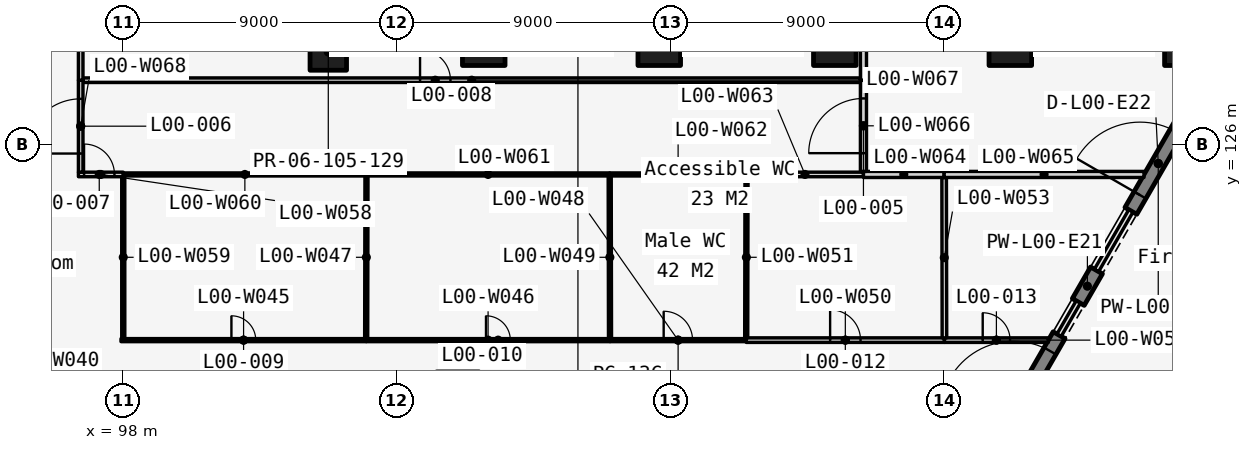
"""IFC4 building model, lengths in metres.
Left out: names, types, materials, properties, quantities, classifications, styles, units other than length and angle.
Written with IfcOpenShell. Run it as: python <this file> out.ifc"""

import sys

from ifc_helpers import new_model, si_unit, direction, frame, frame_2d, origin, origin_2d, place, context, subcontext, project, spatial, rectangle, extrude, element, fill, save


model = new_model("IFC4")
c1 = context("Model", 3, precision=1e-05, world=origin(), true_north=direction((0.0, 1.0)))
c2 = subcontext(c1, "Body", "Model", "MODEL_VIEW")
j1 = project(units=[si_unit("LENGTHUNIT", "METRE"), si_unit("PLANEANGLEUNIT", "RADIAN")], contexts=[c1])
p1 = place(None, origin())
s1 = spatial("IfcSite", under=j1, at=p1, CompositionType="ELEMENT")
p2 = place(p1, origin())
s2 = spatial("IfcBuilding", under=s1, at=p2, CompositionType="ELEMENT")
p3 = place(p2, origin())
s3 = spatial("IfcBuildingStorey", under=s2, at=p3, CompositionType="ELEMENT", Elevation=0.0)
for number, where, z_axis, x_axis in (
    (1, (109.857, 129.284, 0.0), (0.0, 0.0, 1.0), (1.0, 0.0, 0.0)),
    (2, (115.63, 129.284, 0.0), (0.0, 0.0, 1.0), (1.0, 0.0, 0.0)),
    (3, (121.404, 129.284, 0.0), (0.0, 0.0, 1.0), (1.0, 0.0, 0.0)),
    (4, (127.177, 129.284, 0.0), (0.0, 0.0, 1.0), (1.0, 0.0, 0.0)),
    (5, (132.951, 129.284, 0.0), (0.0, 0.0, 1.0), (1.0, 0.0, 0.0)),
):
    element("IfcColumn", number, at=place(p3, frame(where, z_axis=z_axis, x_axis=x_axis)), inside=s3, PredefinedType="COLUMN", context=c2, shape_type="SweptSolid", body=[
        extrude(rectangle(XDim=1.4, YDim=1.4, at=origin_2d()), origin(), (0.0, 0.0, 1.0), 7.5),
    ])
p4 = place(p3, frame((104.744, 129.028, 0.0), z_axis=(0.0, 0.0, 1.0), x_axis=(1.0, 0.0, 0.0)))
e6 = element("IfcColumn", 6, at=p4, inside=s3, PredefinedType="COLUMN", context=c2, shape_type="SweptSolid", body=[
    extrude(rectangle(XDim=1.2, YDim=1.2, at=origin_2d()), origin(), (0.0, 0.0, 1.0), 7.5),
])
p5 = place(p3, frame((126.982, 116.595, -0.3), z_axis=(0.0, 0.0, 1.0), x_axis=(0.500012057535, 0.866018442252, 0.0)))
e7 = element("IfcWall", 7, at=p5, inside=s3, PredefinedType="SOLIDWALL", context=c2, shape_type="SweptSolid", body=[
    extrude(rectangle(XDim=3.6, YDim=0.45, at=frame_2d((1.8, 0.0))), origin(), (0.0, 0.0, 1.0), 6.812),
])
p6 = place(p5, frame((0.6, 0.0, 0.3)))
e8 = element("IfcOpeningElement", 8, at=p6, cuts=e7, PredefinedType="OPENING", context=c2, shape_type="SweptSolid", body=[
    extrude(rectangle(XDim=2.4, YDim=3.0, at=frame_2d((1.2, 1.5))), frame((0.0, 0.235, 0.0), z_axis=(0.0, -1.0, 0.0), x_axis=(1.0, 0.0, 0.0)), (0.0, 0.0, 1.0), 0.47),
])
p7 = place(p3, frame((129.412, 120.805, -0.3), z_axis=(0.0, 0.0, 1.0), x_axis=(0.50012165622, 0.865955154139, 0.0)))
e9 = element("IfcWall", 9, at=p7, inside=s3, PredefinedType="SOLIDWALL", context=c2, shape_type="SweptSolid", body=[
    extrude(rectangle(XDim=1.2, YDim=0.45, at=frame_2d((0.6, 0.0))), origin(), (0.0, 0.0, 1.0), 6.812),
])
p8 = place(p3, frame((131.142, 123.802, -0.3), z_axis=(0.0, 0.0, 1.0), x_axis=(0.500012057535, 0.866018442252, 0.0)))
e10 = element("IfcWall", 10, at=p8, inside=s3, PredefinedType="SOLIDWALL", context=c2, shape_type="SweptSolid", body=[
    extrude(rectangle(XDim=3.6, YDim=0.45, at=frame_2d((1.8, 0.0))), origin(), (0.0, 0.0, 1.0), 6.812),
])
p9 = place(p8, frame((0.6, 0.0, 0.3)))
e11 = element("IfcOpeningElement", 11, at=p9, cuts=e10, PredefinedType="OPENING", context=c2, shape_type="SweptSolid", body=[
    extrude(rectangle(XDim=2.4, YDim=3.0, at=frame_2d((1.2, 1.5))), frame((0.0, 0.235, 0.0), z_axis=(0.0, -1.0, 0.0), x_axis=(1.0, 0.0, 0.0)), (0.0, 0.0, 1.0), 0.47),
])
p10 = place(p3, frame((97.926, 119.55, 0.0), z_axis=(0.0, 0.0, 1.0), x_axis=(1.0, 0.0, 0.0)))
e12 = element("IfcWall", 12, at=p10, inside=s3, PredefinedType="PARTITIONING", context=c2, shape_type="SweptSolid", body=[
    extrude(rectangle(XDim=8.064, YDim=0.1, at=frame_2d((4.032, 0.0))), origin(), (0.0, 0.0, 1.0), 7.2),
])
p11 = place(p10, frame((3.632, 0.0, 0.0)))
e13 = element("IfcOpeningElement", 13, at=p11, cuts=e12, PredefinedType="OPENING", context=c2, shape_type="SweptSolid", body=[
    extrude(rectangle(XDim=0.8, YDim=2.1, at=frame_2d((0.4, 1.05))), frame((0.0, 0.06, 0.0), z_axis=(0.0, -1.0, 0.0), x_axis=(1.0, 0.0, 0.0)), (0.0, 0.0, 1.0), 0.12),
])
p12 = place(p3, frame((105.99, 119.55, 0.0), z_axis=(0.0, 0.0, 1.0), x_axis=(1.0, 0.0, 0.0)))
e14 = element("IfcWall", 14, at=p12, inside=s3, PredefinedType="PARTITIONING", context=c2, shape_type="SweptSolid", body=[
    extrude(rectangle(XDim=8.02, YDim=0.1, at=frame_2d((4.01, 0.0))), origin(), (0.0, 0.0, 1.0), 7.2),
])
p13 = place(p12, frame((3.941, 0.0, 0.0)))
e15 = element("IfcOpeningElement", 15, at=p13, cuts=e14, PredefinedType="OPENING", context=c2, shape_type="SweptSolid", body=[
    extrude(rectangle(XDim=0.8, YDim=2.1, at=frame_2d((0.4, 1.05))), frame((0.0, 0.06, 0.0), z_axis=(0.0, -1.0, 0.0), x_axis=(1.0, 0.0, 0.0)), (0.0, 0.0, 1.0), 0.12),
])
p14 = place(p3, frame((105.99, 119.625, 0.0), z_axis=(0.0, 0.0, 1.0), x_axis=(0.001796487036, 0.999998386316, 0.0)))
e16 = element("IfcWall", 16, at=p14, inside=s3, PredefinedType="PARTITIONING", context=c2, shape_type="SweptSolid", body=[
    extrude(rectangle(XDim=5.3, YDim=0.1, at=frame_2d((2.65, 0.0))), origin(), (0.0, 0.0, 1.0), 7.2),
])
p15 = place(p3, frame((114.01, 119.55, 0.0), z_axis=(0.0, 0.0, 1.0), x_axis=(1.0, 0.0, 0.0)))
e17 = element("IfcWall", 17, at=p15, inside=s3, PredefinedType="PARTITIONING", context=c2, shape_type="SweptSolid", body=[
    extrude(rectangle(XDim=4.48, YDim=0.1, at=frame_2d((2.24, 0.0))), origin(), (0.0, 0.0, 1.0), 7.2),
])
p16 = place(p15, frame((1.765, 0.0, 0.0)))
e18 = element("IfcOpeningElement", 18, at=p16, cuts=e17, PredefinedType="OPENING", context=c2, shape_type="SweptSolid", body=[
    extrude(rectangle(XDim=0.95, YDim=2.1, at=frame_2d((0.475, 1.05))), frame((0.0, 0.06, 0.0), z_axis=(0.0, -1.0, 0.0), x_axis=(1.0, 0.0, 0.0)), (0.0, 0.0, 1.0), 0.12),
])
p17 = place(p3, frame((114.01, 119.625, 0.0), z_axis=(0.0, 0.0, 1.0), x_axis=(-0.001796487036, 0.999998386316, 0.0)))
e19 = element("IfcWall", 19, at=p17, inside=s3, PredefinedType="PARTITIONING", context=c2, shape_type="SweptSolid", body=[
    extrude(rectangle(XDim=5.3, YDim=0.1, at=frame_2d((2.65, 0.0))), origin(), (0.0, 0.0, 1.0), 7.2),
])
p18 = place(p3, frame((118.49, 119.55, 0.0), z_axis=(0.0, 0.0, 1.0), x_axis=(1.0, 0.0, 0.0)))
e20 = element("IfcWall", 20, at=p18, inside=s3, PredefinedType="PARTITIONING", context=c2, shape_type="SweptSolid", body=[
    extrude(rectangle(XDim=6.52, YDim=0.15, at=frame_2d((3.26, 0.0))), origin(), (0.0, 0.0, 1.0), 7.2),
])
p19 = place(p18, frame((2.76, 0.0, 0.0)))
e21 = element("IfcOpeningElement", 21, at=p19, cuts=e20, PredefinedType="OPENING", context=c2, shape_type="SweptSolid", body=[
    extrude(rectangle(XDim=1.0, YDim=2.1, at=frame_2d((0.5, 1.05))), frame((0.0, 0.085, 0.0), z_axis=(0.0, -1.0, 0.0), x_axis=(1.0, 0.0, 0.0)), (0.0, 0.0, 1.0), 0.17),
])
p20 = place(p3, frame((118.49, 119.625, 0.0), z_axis=(0.0, 0.0, 1.0), x_axis=(0.001796487036, 0.999998386316, 0.0)))
e22 = element("IfcWall", 22, at=p20, inside=s3, PredefinedType="PARTITIONING", context=c2, shape_type="SweptSolid", body=[
    extrude(rectangle(XDim=5.3, YDim=0.1, at=frame_2d((2.65, 0.0))), origin(), (0.0, 0.0, 1.0), 7.2),
])
p21 = place(p3, frame((125.01, 119.55, 0.0), z_axis=(0.0, 0.0, 1.0), x_axis=(1.0, 0.0, 0.0)))
e23 = element("IfcWall", 23, at=p21, inside=s3, PredefinedType="PARTITIONING", context=c2, shape_type="SweptSolid", body=[
    extrude(rectangle(XDim=3.418, YDim=0.15, at=frame_2d((1.709, 0.0))), origin(), (0.0, 0.0, 1.0), 7.2),
])
p22 = place(p21, frame((1.259, 0.0, 0.0)))
e24 = element("IfcOpeningElement", 24, at=p22, cuts=e23, PredefinedType="OPENING", context=c2, shape_type="SweptSolid", body=[
    extrude(rectangle(XDim=0.9, YDim=2.1, at=frame_2d((0.45, 1.05))), frame((0.0, 0.085, 0.0), z_axis=(0.0, -1.0, 0.0), x_axis=(1.0, 0.0, 0.0)), (0.0, 0.0, 1.0), 0.17),
])
p23 = place(p3, frame((125.01, 119.625, 0.0), z_axis=(0.0, 0.0, 1.0), x_axis=(-0.001805051211, 0.999998370894, 0.0)))
e25 = element("IfcWall", 25, at=p23, inside=s3, PredefinedType="PARTITIONING", context=c2, shape_type="SweptSolid", body=[
    extrude(rectangle(XDim=5.275, YDim=0.15, at=frame_2d((2.637, 0.0))), origin(), (0.0, 0.0, 1.0), 7.2),
])
p24 = place(p3, frame((96.525, 125.0, 0.0), z_axis=(0.0, 0.0, 1.0), x_axis=(1.0, 0.0, 0.0)))
e26 = element("IfcWall", 26, at=p24, inside=s3, PredefinedType="PARTITIONING", context=c2, shape_type="SweptSolid", body=[
    extrude(rectangle(XDim=1.475, YDim=0.15, at=frame_2d((0.737, 0.0))), origin(), (0.0, 0.0, 1.0), 7.2),
])
p25 = place(p24, frame((0.185, 0.0, 0.0)))
e27 = element("IfcOpeningElement", 27, at=p25, cuts=e26, PredefinedType="OPENING", context=c2, shape_type="SweptSolid", body=[
    extrude(rectangle(XDim=1.0, YDim=2.1, at=frame_2d((0.5, 1.05))), frame((0.0, 0.085, 0.0), z_axis=(0.0, -1.0, 0.0), x_axis=(1.0, 0.0, 0.0)), (0.0, 0.0, 1.0), 0.17),
])
p26 = place(p3, frame((98.0, 119.625, 0.0), z_axis=(0.0, 0.0, 1.0), x_axis=(-9.2127689e-05, 0.999999995756, 0.0)))
e28 = element("IfcWall", 28, at=p26, inside=s3, PredefinedType="PARTITIONING", context=c2, shape_type="SweptSolid", body=[
    extrude(rectangle(XDim=5.3, YDim=0.1, at=frame_2d((2.65, 0.0))), origin(), (0.0, 0.0, 1.0), 6.339),
])
for number, where, z_axis, x_axis in (
    (29, (98.0, 125.0, 0.0), (0.0, 0.0, 1.0), (1.0, 0.0, 0.0)),
    (30, (106.0, 125.0, 0.0), (0.0, 0.0, 1.0), (1.0, 0.0, 0.0)),
):
    element("IfcWall", number, at=place(p3, frame(where, z_axis=z_axis, x_axis=x_axis)), inside=s3, PredefinedType="PARTITIONING", context=c2, shape_type="SweptSolid", body=[
        extrude(rectangle(XDim=8.0, YDim=0.1, at=frame_2d((4.0, 0.0))), origin(), (0.0, 0.0, 1.0), 7.2),
    ])
p27 = place(p3, frame((114.0, 125.0, 0.0), z_axis=(0.0, 0.0, 1.0), x_axis=(1.0, 0.0, 0.0)))
e31 = element("IfcWall", 31, at=p27, inside=s3, PredefinedType="PARTITIONING", context=c2, shape_type="SweptSolid", body=[
    extrude(rectangle(XDim=4.5, YDim=0.1, at=frame_2d((2.25, 0.0))), origin(), (0.0, 0.0, 1.0), 7.2),
])
p28 = place(p3, frame((118.5, 125.0, 0.0), z_axis=(0.0, 0.0, 1.0), x_axis=(1.0, 0.0, 0.0)))
e32 = element("IfcWall", 32, at=p28, inside=s3, PredefinedType="PARTITIONING", context=c2, shape_type="SweptSolid", body=[
    extrude(rectangle(XDim=3.846, YDim=0.15, at=frame_2d((1.923, 0.0))), origin(), (0.0, 0.0, 1.0), 7.2),
])
p29 = place(p3, frame((122.346, 125.0, 0.0), z_axis=(0.0, 0.0, 1.0), x_axis=(1.0, 0.0, 0.0)))
e33 = element("IfcWall", 33, at=p29, inside=s3, PredefinedType="PARTITIONING", context=c2, shape_type="SweptSolid", body=[
    extrude(rectangle(XDim=2.654, YDim=0.2, at=frame_2d((1.327, 0.0))), origin(), (0.0, 0.0, 1.0), 7.2),
])
p30 = place(p3, frame((125.0, 125.0, 0.0), z_axis=(0.0, 0.0, 1.0), x_axis=(1.0, 0.0, 0.0)))
e34 = element("IfcWall", 34, at=p30, inside=s3, PredefinedType="PARTITIONING", context=c2, shape_type="SweptSolid", body=[
    extrude(rectangle(XDim=6.574, YDim=0.2, at=frame_2d((3.287, 0.0))), origin(), (0.0, 0.0, 1.0), 7.2),
])
p31 = place(p3, frame((122.346, 125.1, 0.0), z_axis=(0.0, 0.0, 1.0), x_axis=(0.0, 1.0, 0.0)))
e35 = element("IfcWall", 35, at=p31, inside=s3, PredefinedType="PARTITIONING", context=c2, shape_type="SweptSolid", body=[
    extrude(rectangle(XDim=3.0, YDim=0.2, at=frame_2d((1.5, 0.0))), origin(), (0.0, 0.0, 1.0), 7.2),
])
p32 = place(p31, frame((0.6, 0.0, 0.0)))
e36 = element("IfcOpeningElement", 36, at=p32, cuts=e35, PredefinedType="OPENING", context=c2, shape_type="SweptSolid", body=[
    extrude(rectangle(XDim=1.8, YDim=2.1, at=frame_2d((0.9, 1.05))), frame((0.0, 0.11, 0.0), z_axis=(0.0, -1.0, 0.0), x_axis=(1.0, 0.0, 0.0)), (0.0, 0.0, 1.0), 0.22),
])
p33 = place(p3, frame((96.675, 128.1, 0.0), z_axis=(0.0, 0.0, 1.0), x_axis=(1.0, 0.0, 0.0)))
e37 = element("IfcWall", 37, at=p33, inside=s3, PredefinedType="PARTITIONING", context=c2, shape_type="SweptSolid", body=[
    extrude(rectangle(XDim=25.571, YDim=0.15, at=frame_2d((12.786, 0.0))), origin(), (0.0, 0.0, 1.0), 7.2),
])
p34 = place(p33, frame((11.087, 0.0, 0.0)))
e38 = element("IfcOpeningElement", 38, at=p34, cuts=e37, PredefinedType="OPENING", context=c2, shape_type="SweptSolid", body=[
    extrude(rectangle(XDim=1.0, YDim=2.1, at=frame_2d((0.5, 1.05))), frame((0.0, 0.085, 0.0), z_axis=(0.0, -1.0, 0.0), x_axis=(1.0, 0.0, 0.0)), (0.0, 0.0, 1.0), 0.17),
])
p35 = place(p3, frame((96.601, 125.075, 0.0), z_axis=(0.0, 0.0, 1.0), x_axis=(-0.000161407471, 0.999999986974, 0.0)))
e39 = element("IfcWall", 39, at=p35, inside=s3, PredefinedType="PARTITIONING", context=c2, shape_type="SweptSolid", body=[
    extrude(rectangle(XDim=3.025, YDim=0.15, at=frame_2d((1.513, 0.0))), origin(), (0.0, 0.0, 1.0), 7.2),
])
p36 = place(p35, frame((0.613, 0.0, 0.0)))
e40 = element("IfcOpeningElement", 40, at=p36, cuts=e39, PredefinedType="OPENING", context=c2, shape_type="SweptSolid", body=[
    extrude(rectangle(XDim=1.8, YDim=2.1, at=frame_2d((0.9, 1.05))), frame((0.0, 0.085, 0.0), z_axis=(0.0, -1.0, 0.0), x_axis=(1.0, 0.0, 0.0)), (0.0, 0.0, 1.0), 0.17),
])
p37 = place(p3, frame((96.6, 128.1, 0.0), z_axis=(0.0, 0.0, 1.0), x_axis=(0.0, 1.0, 0.0)))
e41 = element("IfcWall", 41, at=p37, inside=s3, PredefinedType="PARTITIONING", context=c2, shape_type="SweptSolid", body=[
    extrude(rectangle(XDim=6.45, YDim=0.15, at=frame_2d((3.225, 0.0))), origin(), (0.0, 0.0, 1.0), 7.2),
])
p38 = place(p3, frame((122.346, 128.1, 0.0), z_axis=(0.0, 0.0, 1.0), x_axis=(0.0, 1.0, 0.0)))
e42 = element("IfcWall", 42, at=p38, inside=s3, PredefinedType="PARTITIONING", context=c2, shape_type="SweptSolid", body=[
    extrude(rectangle(XDim=6.45, YDim=0.2, at=frame_2d((3.225, 0.0))), origin(), (0.0, 0.0, 1.0), 7.2),
])
p39 = place(p6, origin())
e43 = element("IfcDoor", 43, at=p39, inside=s3, OperationType="DOUBLE_DOOR_SINGLE_SWING", PredefinedType="DOOR", context=c2, shape_type="SweptSolid", body=[
    extrude(rectangle(XDim=2.4, YDim=3.0, at=frame_2d((1.2, 1.5))), frame((0.0, 0.025, 0.0), z_axis=(0.0, -1.0, 0.0), x_axis=(1.0, 0.0, 0.0)), (0.0, 0.0, 1.0), 0.05),
])
fill(e8, e43)
p40 = place(p9, origin())
e44 = element("IfcDoor", 44, at=p40, inside=s3, OperationType="DOUBLE_DOOR_SINGLE_SWING", PredefinedType="DOOR", context=c2, shape_type="SweptSolid", body=[
    extrude(rectangle(XDim=2.4, YDim=3.0, at=frame_2d((1.2, 1.5))), frame((0.0, 0.025, 0.0), z_axis=(0.0, -1.0, 0.0), x_axis=(1.0, 0.0, 0.0)), (0.0, 0.0, 1.0), 0.05),
])
fill(e11, e44)
p41 = place(p32, origin())
e45 = element("IfcDoor", 45, at=p41, inside=s3, OperationType="SINGLE_SWING_LEFT", PredefinedType="DOOR", context=c2, shape_type="SweptSolid", body=[
    extrude(rectangle(XDim=1.8, YDim=2.1, at=frame_2d((0.9, 1.05))), frame((0.0, 0.025, 0.0), z_axis=(0.0, -1.0, 0.0), x_axis=(1.0, 0.0, 0.0)), (0.0, 0.0, 1.0), 0.05),
])
fill(e36, e45)
p42 = place(p36, origin())
e46 = element("IfcDoor", 46, at=p42, inside=s3, OperationType="SINGLE_SWING_LEFT", PredefinedType="DOOR", context=c2, shape_type="SweptSolid", body=[
    extrude(rectangle(XDim=1.8, YDim=2.1, at=frame_2d((0.9, 1.05))), frame((0.0, 0.025, 0.0), z_axis=(0.0, -1.0, 0.0), x_axis=(1.0, 0.0, 0.0)), (0.0, 0.0, 1.0), 0.05),
])
fill(e40, e46)
p43 = place(p25, origin())
e47 = element("IfcDoor", 47, at=p43, inside=s3, OperationType="SINGLE_SWING_LEFT", PredefinedType="DOOR", context=c2, shape_type="SweptSolid", body=[
    extrude(rectangle(XDim=1.0, YDim=2.1, at=frame_2d((0.5, 1.05))), frame((0.0, 0.025, 0.0), z_axis=(0.0, -1.0, 0.0), x_axis=(1.0, 0.0, 0.0)), (0.0, 0.0, 1.0), 0.05),
])
fill(e27, e47)
p44 = place(p34, origin())
e48 = element("IfcDoor", 48, at=p44, inside=s3, OperationType="SINGLE_SWING_LEFT", PredefinedType="DOOR", context=c2, shape_type="SweptSolid", body=[
    extrude(rectangle(XDim=1.0, YDim=2.1, at=frame_2d((0.5, 1.05))), frame((0.0, 0.025, 0.0), z_axis=(0.0, -1.0, 0.0), x_axis=(1.0, 0.0, 0.0)), (0.0, 0.0, 1.0), 0.05),
])
fill(e38, e48)
p45 = place(p11, origin())
e49 = element("IfcDoor", 49, at=p45, inside=s3, OperationType="SINGLE_SWING_LEFT", PredefinedType="DOOR", context=c2, shape_type="SweptSolid", body=[
    extrude(rectangle(XDim=0.8, YDim=2.1, at=frame_2d((0.4, 1.05))), frame((0.0, 0.025, 0.0), z_axis=(0.0, -1.0, 0.0), x_axis=(1.0, 0.0, 0.0)), (0.0, 0.0, 1.0), 0.05),
])
fill(e13, e49)
p46 = place(p13, origin())
e50 = element("IfcDoor", 50, at=p46, inside=s3, OperationType="SINGLE_SWING_LEFT", PredefinedType="DOOR", context=c2, shape_type="SweptSolid", body=[
    extrude(rectangle(XDim=0.8, YDim=2.1, at=frame_2d((0.4, 1.05))), frame((0.0, 0.025, 0.0), z_axis=(0.0, -1.0, 0.0), x_axis=(1.0, 0.0, 0.0)), (0.0, 0.0, 1.0), 0.05),
])
fill(e15, e50)
p47 = place(p16, origin())
e51 = element("IfcDoor", 51, at=p47, inside=s3, OperationType="SINGLE_SWING_LEFT", PredefinedType="DOOR", context=c2, shape_type="SweptSolid", body=[
    extrude(rectangle(XDim=0.95, YDim=2.1, at=frame_2d((0.475, 1.05))), frame((0.0, 0.025, 0.0), z_axis=(0.0, -1.0, 0.0), x_axis=(1.0, 0.0, 0.0)), (0.0, 0.0, 1.0), 0.05),
])
fill(e18, e51)
p48 = place(p19, origin())
e52 = element("IfcDoor", 52, at=p48, inside=s3, OperationType="SINGLE_SWING_LEFT", PredefinedType="DOOR", context=c2, shape_type="SweptSolid", body=[
    extrude(rectangle(XDim=1.0, YDim=2.1, at=frame_2d((0.5, 1.05))), frame((0.0, 0.025, 0.0), z_axis=(0.0, -1.0, 0.0), x_axis=(1.0, 0.0, 0.0)), (0.0, 0.0, 1.0), 0.05),
])
fill(e21, e52)
p49 = place(p22, origin())
e53 = element("IfcDoor", 53, at=p49, inside=s3, OperationType="SINGLE_SWING_LEFT", PredefinedType="DOOR", context=c2, shape_type="SweptSolid", body=[
    extrude(rectangle(XDim=0.9, YDim=2.1, at=frame_2d((0.45, 1.05))), frame((0.0, 0.025, 0.0), z_axis=(0.0, -1.0, 0.0), x_axis=(1.0, 0.0, 0.0)), (0.0, 0.0, 1.0), 0.05),
])
fill(e24, e53)
save(model, sys.argv[1])
